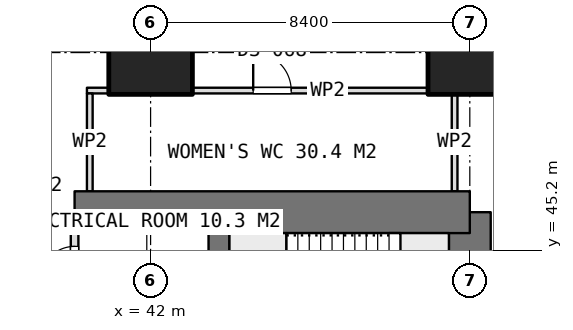
"""IFC4 building model, lengths in metres.
Left out: names, types, materials, properties, quantities, classifications, styles, units other than length and angle.
Written with IfcOpenShell. Run it as: python <this file> out.ifc"""

import sys

from ifc_helpers import new_model, si_unit, direction, frame, frame_2d, origin, origin_2d, place, context, subcontext, project, spatial, rectangle, extrude, element, fill, save


model = new_model("IFC4")
c1 = context("Model", 3, precision=1e-05, world=origin(), true_north=direction((0.0, 1.0)))
c2 = subcontext(c1, "Body", "Model", "MODEL_VIEW")
j1 = project(units=[si_unit("LENGTHUNIT", "METRE"), si_unit("PLANEANGLEUNIT", "RADIAN")], contexts=[c1])
p1 = place(None, origin())
s1 = spatial("IfcSite", under=j1, at=p1, CompositionType="ELEMENT")
p2 = place(p1, origin())
s2 = spatial("IfcBuilding", under=s1, at=p2, CompositionType="ELEMENT")
p3 = place(p2, frame((0.0, 0.0, 59.15)))
s3 = spatial("IfcBuildingStorey", under=s2, at=p3, CompositionType="ELEMENT", Elevation=59.15)
p4 = place(p3, frame((40.0, 46.2, 0.0), z_axis=(0.0, 0.0, 1.0), x_axis=(1.0, 0.0, 0.0)))
e1 = element("IfcWall", 1, at=p4, inside=s3, PredefinedType="SHEAR", context=c2, shape_type="SweptSolid", body=[
    extrude(rectangle(XDim=10.4, YDim=1.1, at=frame_2d((5.2, 0.0))), origin(), (0.0, 0.0, 1.0), 3.75),
])
p5 = place(p3, frame((50.4, 21.0, 0.0), z_axis=(0.0, 0.0, 1.0), x_axis=(0.0, 1.0, 0.0)))
e2 = element("IfcWall", 2, at=p5, inside=s3, PredefinedType="SHEAR", context=c2, shape_type="SweptSolid", body=[
    extrude(rectangle(XDim=25.2, YDim=1.1, at=frame_2d((12.6, 0.0))), origin(), (0.0, 0.0, 1.0), 3.75),
])
p6 = place(p5, frame((16.2, 0.0, 0.0)))
e3 = element("IfcOpeningElement", 3, at=p6, cuts=e2, PredefinedType="OPENING", context=c2, shape_type="SweptSolid", body=[
    extrude(rectangle(XDim=1.2, YDim=2.1, at=frame_2d((0.6, 1.05))), frame((0.0, 0.56, 0.0), z_axis=(0.0, -1.0, 0.0), x_axis=(1.0, 0.0, 0.0)), (0.0, 0.0, 1.0), 1.12),
])
p7 = place(p5, frame((10.05, 0.0, 0.0)))
e4 = element("IfcOpeningElement", 4, at=p7, cuts=e2, PredefinedType="OPENING", context=c2, shape_type="SweptSolid", body=[
    extrude(rectangle(XDim=0.9, YDim=2.1, at=frame_2d((0.45, 1.05))), frame((0.0, 0.56, 0.0), z_axis=(0.0, -1.0, 0.0), x_axis=(1.0, 0.0, 0.0)), (0.0, 0.0, 1.0), 1.12),
])
p8 = place(p5, frame((7.45, 0.0, 0.0)))
e5 = element("IfcOpeningElement", 5, at=p8, cuts=e2, PredefinedType="OPENING", context=c2, shape_type="SweptSolid", body=[
    extrude(rectangle(XDim=0.9, YDim=2.1, at=frame_2d((0.45, 1.05))), frame((0.0, 0.56, 0.0), z_axis=(0.0, -1.0, 0.0), x_axis=(1.0, 0.0, 0.0)), (0.0, 0.0, 1.0), 1.12),
])
p9 = place(p5, frame((0.75, 0.0, 0.0)))
e6 = element("IfcOpeningElement", 6, at=p9, cuts=e2, PredefinedType="OPENING", context=c2, shape_type="SweptSolid", body=[
    extrude(rectangle(XDim=1.2, YDim=2.1, at=frame_2d((0.6, 1.05))), frame((0.0, 0.56, 0.0), z_axis=(0.0, -1.0, 0.0), x_axis=(1.0, 0.0, 0.0)), (0.0, 0.0, 1.0), 1.12),
])
p10 = place(p3, frame((43.8, 21.0, 0.0), z_axis=(0.0, 0.0, 1.0), x_axis=(0.0, 1.0, 0.0)))
e7 = element("IfcWall", 7, at=p10, inside=s3, PredefinedType="SHEAR", context=c2, shape_type="SweptSolid", body=[
    extrude(rectangle(XDim=25.2, YDim=0.55, at=frame_2d((12.6, 0.0))), origin(), (0.0, 0.0, 1.0), 3.75),
])
for number, where, z_axis, x_axis in (
    (8, (42.0, 50.4, 0.0), (0.0, 0.0, 1.0), (1.0, 0.0, 0.0)),
    (9, (50.4, 50.4, 0.0), (0.0, 0.0, 1.0), (1.0, 0.0, 0.0)),
):
    element("IfcColumn", number, at=place(p3, frame(where, z_axis=z_axis, x_axis=x_axis)), inside=s3, PredefinedType="COLUMN", context=c2, shape_type="SweptSolid", body=[
        extrude(rectangle(XDim=2.2, YDim=2.2, at=origin_2d()), origin(), (0.0, 0.0, 1.0), 3.75),
    ])
p11 = place(p3, frame((40.0, 41.675, 0.0), z_axis=(0.0, 0.0, 1.0), x_axis=(0.0, 1.0, 0.0)))
e10 = element("IfcWall", 10, at=p11, inside=s3, PredefinedType="PARTITIONING", context=c2, shape_type="SweptSolid", body=[
    extrude(rectangle(XDim=3.975, YDim=0.2, at=frame_2d((1.987, 0.0))), origin(), (0.0, 0.0, 1.0), 3.5),
])
p12 = place(p11, frame((2.725, 0.0, 0.0)))
e11 = element("IfcOpeningElement", 11, at=p12, cuts=e10, PredefinedType="OPENING", context=c2, shape_type="SweptSolid", body=[
    extrude(rectangle(XDim=0.9, YDim=2.1, at=frame_2d((0.45, 1.05))), frame((0.0, 0.11, 0.0), z_axis=(0.0, -1.0, 0.0), x_axis=(1.0, 0.0, 0.0)), (0.0, 0.0, 1.0), 0.22),
])
p13 = place(p11, frame((0.275, 0.0, 0.0)))
e12 = element("IfcOpeningElement", 12, at=p13, cuts=e10, PredefinedType="OPENING", context=c2, shape_type="SweptSolid", body=[
    extrude(rectangle(XDim=1.0, YDim=2.1, at=frame_2d((0.5, 1.05))), frame((0.0, 0.11, 0.0), z_axis=(0.0, -1.0, 0.0), x_axis=(1.0, 0.0, 0.0)), (0.0, 0.0, 1.0), 0.22),
])
p14 = place(p3, frame((40.325, 49.4, 0.0), z_axis=(0.0, 0.0, 1.0), x_axis=(1.0, 0.0, 0.0)))
e13 = element("IfcWall", 13, at=p14, inside=s3, PredefinedType="PARTITIONING", context=c2, shape_type="SweptSolid", body=[
    extrude(rectangle(XDim=9.75, YDim=0.15, at=frame_2d((4.875, 0.0))), origin(), (0.0, 0.0, 1.0), 3.5),
])
p15 = place(p14, frame((4.375, 0.0, 0.0)))
e14 = element("IfcOpeningElement", 14, at=p15, cuts=e13, PredefinedType="OPENING", context=c2, shape_type="SweptSolid", body=[
    extrude(rectangle(XDim=1.0, YDim=2.1, at=frame_2d((0.5, 1.05))), frame((0.0, 0.085, 0.0), z_axis=(0.0, -1.0, 0.0), x_axis=(1.0, 0.0, 0.0)), (0.0, 0.0, 1.0), 0.17),
])
for number, where, z_axis, x_axis in (
    (15, (40.4, 46.75, 0.0), (0.0, 0.0, 1.0), (0.0, 1.0, 0.0)),
    (16, (50.0, 46.75, 0.0), (0.0, 0.0, 1.0), (0.0, 1.0, 0.0)),
):
    element("IfcWall", number, at=place(p3, frame(where, z_axis=z_axis, x_axis=x_axis)), inside=s3, PredefinedType="PARTITIONING", context=c2, shape_type="SweptSolid", body=[
        extrude(rectangle(XDim=2.575, YDim=0.15, at=frame_2d((1.288, 0.0))), origin(), (0.0, 0.0, 1.0), 3.5),
    ])
p16 = place(p12, origin())
e17 = element("IfcDoor", 17, at=p16, inside=s3, OperationType="SINGLE_SWING_LEFT", PredefinedType="DOOR", context=c2, shape_type="SweptSolid", body=[
    extrude(rectangle(XDim=0.9, YDim=2.1, at=frame_2d((0.45, 1.05))), frame((0.0, 0.025, 0.0), z_axis=(0.0, -1.0, 0.0), x_axis=(1.0, 0.0, 0.0)), (0.0, 0.0, 1.0), 0.05),
])
fill(e11, e17)
p17 = place(p15, origin())
e18 = element("IfcDoor", 18, at=p17, inside=s3, OperationType="SINGLE_SWING_LEFT", PredefinedType="DOOR", context=c2, shape_type="SweptSolid", body=[
    extrude(rectangle(XDim=1.0, YDim=2.1, at=frame_2d((0.5, 1.05))), frame((0.0, 0.025, 0.0), z_axis=(0.0, -1.0, 0.0), x_axis=(1.0, 0.0, 0.0)), (0.0, 0.0, 1.0), 0.05),
])
fill(e14, e18)
save(model, sys.argv[1])
